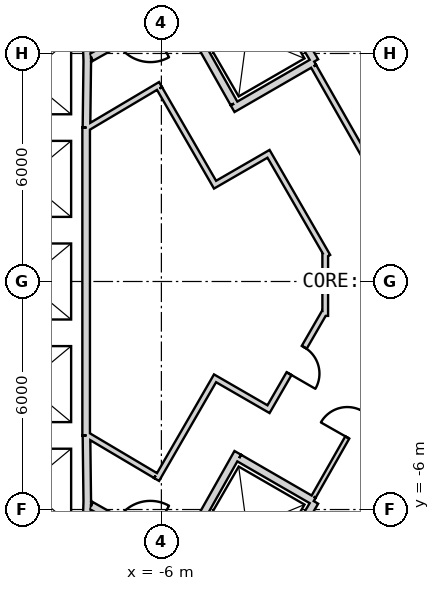
"""IFC4 building model, lengths in metres.
Left out: names, types, materials, properties, quantities, classifications, styles, units other than length and angle.
Written with IfcOpenShell. Run it as: python <this file> out.ifc"""

import sys

from ifc_helpers import new_model, si_unit, direction, frame, frame_2d, origin, place, context, subcontext, project, spatial, rectangle, extrude, element, fill, save


model = new_model("IFC4")
c1 = context("Model", 3, precision=1e-05, world=origin(), true_north=direction((0.0, 1.0)))
c2 = subcontext(c1, "Body", "Model", "MODEL_VIEW")
j1 = project(units=[si_unit("LENGTHUNIT", "METRE"), si_unit("PLANEANGLEUNIT", "RADIAN")], contexts=[c1])
p1 = place(None, origin())
s1 = spatial("IfcSite", under=j1, at=p1, CompositionType="ELEMENT")
p2 = place(p1, origin())
s2 = spatial("IfcBuilding", under=s1, at=p2, CompositionType="ELEMENT")
p3 = place(p2, frame((0.0, 0.0, 27.5)))
s3 = spatial("IfcBuildingStorey", under=s2, at=p3, CompositionType="ELEMENT", Elevation=27.5)
p4 = place(p3, frame((19.475, 2.208, 0.0), z_axis=(0.0, 0.0, 1.0), x_axis=(-0.866028369851, 0.499994862586, 0.0)))
e1 = element("IfcWall", 1, at=p4, inside=s3, PredefinedType="SHEAR", context=c2, shape_type="SweptSolid", body=[
    extrude(rectangle(XDim=31.523, YDim=0.9, at=frame_2d((15.762, 0.0))), origin(), (0.0, 0.0, 1.0), 6.0),
])
p5 = place(p4, frame((7.062, 0.0, 0.0)))
e2 = element("IfcOpeningElement", 2, at=p5, cuts=e1, PredefinedType="OPENING", context=c2, shape_type="SweptSolid", body=[
    extrude(rectangle(XDim=1.2, YDim=2.4, at=frame_2d((0.6, 1.2))), frame((0.0, 0.46, 0.0), z_axis=(0.0, -1.0, 0.0), x_axis=(1.0, 0.0, 0.0)), (0.0, 0.0, 1.0), 0.92),
])
p6 = place(p4, frame((9.762, 0.0, 0.0)))
e3 = element("IfcOpeningElement", 3, at=p6, cuts=e1, PredefinedType="OPENING", context=c2, shape_type="SweptSolid", body=[
    extrude(rectangle(XDim=1.2, YDim=2.4, at=frame_2d((0.6, 1.2))), frame((0.0, 0.46, 0.0), z_axis=(0.0, -1.0, 0.0), x_axis=(1.0, 0.0, 0.0)), (0.0, 0.0, 1.0), 0.92),
])
p7 = place(p4, frame((12.462, 0.0, 0.0)))
e4 = element("IfcOpeningElement", 4, at=p7, cuts=e1, PredefinedType="OPENING", context=c2, shape_type="SweptSolid", body=[
    extrude(rectangle(XDim=1.2, YDim=2.4, at=frame_2d((0.6, 1.2))), frame((0.0, 0.46, 0.0), z_axis=(0.0, -1.0, 0.0), x_axis=(1.0, 0.0, 0.0)), (0.0, 0.0, 1.0), 0.92),
])
p8 = place(p4, frame((15.162, 0.0, 0.0)))
e5 = element("IfcOpeningElement", 5, at=p8, cuts=e1, PredefinedType="OPENING", context=c2, shape_type="SweptSolid", body=[
    extrude(rectangle(XDim=1.2, YDim=2.4, at=frame_2d((0.6, 1.2))), frame((0.0, 0.46, 0.0), z_axis=(0.0, -1.0, 0.0), x_axis=(1.0, 0.0, 0.0)), (0.0, 0.0, 1.0), 0.92),
])
p9 = place(p4, frame((17.862, 0.0, 0.0)))
e6 = element("IfcOpeningElement", 6, at=p9, cuts=e1, PredefinedType="OPENING", context=c2, shape_type="SweptSolid", body=[
    extrude(rectangle(XDim=1.2, YDim=2.4, at=frame_2d((0.6, 1.2))), frame((0.0, 0.46, 0.0), z_axis=(0.0, -1.0, 0.0), x_axis=(1.0, 0.0, 0.0)), (0.0, 0.0, 1.0), 0.92),
])
p10 = place(p4, frame((20.562, 0.0, 0.0)))
e7 = element("IfcOpeningElement", 7, at=p10, cuts=e1, PredefinedType="OPENING", context=c2, shape_type="SweptSolid", body=[
    extrude(rectangle(XDim=1.2, YDim=2.4, at=frame_2d((0.6, 1.2))), frame((0.0, 0.46, 0.0), z_axis=(0.0, -1.0, 0.0), x_axis=(1.0, 0.0, 0.0)), (0.0, 0.0, 1.0), 0.92),
])
p11 = place(p4, frame((23.262, 0.0, 0.0)))
e8 = element("IfcOpeningElement", 8, at=p11, cuts=e1, PredefinedType="OPENING", context=c2, shape_type="SweptSolid", body=[
    extrude(rectangle(XDim=1.2, YDim=2.4, at=frame_2d((0.6, 1.2))), frame((0.0, 0.46, 0.0), z_axis=(0.0, -1.0, 0.0), x_axis=(1.0, 0.0, 0.0)), (0.0, 0.0, 1.0), 0.92),
])
p12 = place(p4, frame((3.612, 0.0, 0.0)))
e9 = element("IfcOpeningElement", 9, at=p12, cuts=e1, PredefinedType="OPENING", context=c2, shape_type="SweptSolid", body=[
    extrude(rectangle(XDim=1.2, YDim=2.4, at=frame_2d((0.6, 1.2))), frame((0.0, 0.46, 0.0), z_axis=(0.0, -1.0, 0.0), x_axis=(1.0, 0.0, 0.0)), (0.0, 0.0, 1.0), 0.92),
])
p13 = place(p4, frame((26.712, 0.0, 0.0)))
e10 = element("IfcOpeningElement", 10, at=p13, cuts=e1, PredefinedType="OPENING", context=c2, shape_type="SweptSolid", body=[
    extrude(rectangle(XDim=1.2, YDim=2.4, at=frame_2d((0.6, 1.2))), frame((0.0, 0.46, 0.0), z_axis=(0.0, -1.0, 0.0), x_axis=(1.0, 0.0, 0.0)), (0.0, 0.0, 1.0), 0.92),
])
p14 = place(p3, frame((-7.825, -17.97, 0.0), z_axis=(0.0, 0.0, 1.0), x_axis=(0.866028369851, 0.499994862586, 0.0)))
e11 = element("IfcWall", 11, at=p14, inside=s3, PredefinedType="SHEAR", context=c2, shape_type="SweptSolid", body=[
    extrude(rectangle(XDim=31.523, YDim=0.9, at=frame_2d((15.762, 0.0))), origin(), (0.0, 0.0, 1.0), 6.0),
])
p15 = place(p14, frame((7.062, 0.0, 0.0)))
e12 = element("IfcOpeningElement", 12, at=p15, cuts=e11, PredefinedType="OPENING", context=c2, shape_type="SweptSolid", body=[
    extrude(rectangle(XDim=1.2, YDim=2.4, at=frame_2d((0.6, 1.2))), frame((0.0, 0.46, 0.0), z_axis=(0.0, -1.0, 0.0), x_axis=(1.0, 0.0, 0.0)), (0.0, 0.0, 1.0), 0.92),
])
p16 = place(p14, frame((9.762, 0.0, 0.0)))
e13 = element("IfcOpeningElement", 13, at=p16, cuts=e11, PredefinedType="OPENING", context=c2, shape_type="SweptSolid", body=[
    extrude(rectangle(XDim=1.2, YDim=2.4, at=frame_2d((0.6, 1.2))), frame((0.0, 0.46, 0.0), z_axis=(0.0, -1.0, 0.0), x_axis=(1.0, 0.0, 0.0)), (0.0, 0.0, 1.0), 0.92),
])
p17 = place(p14, frame((12.462, 0.0, 0.0)))
e14 = element("IfcOpeningElement", 14, at=p17, cuts=e11, PredefinedType="OPENING", context=c2, shape_type="SweptSolid", body=[
    extrude(rectangle(XDim=1.2, YDim=2.4, at=frame_2d((0.6, 1.2))), frame((0.0, 0.46, 0.0), z_axis=(0.0, -1.0, 0.0), x_axis=(1.0, 0.0, 0.0)), (0.0, 0.0, 1.0), 0.92),
])
p18 = place(p14, frame((15.162, 0.0, 0.0)))
e15 = element("IfcOpeningElement", 15, at=p18, cuts=e11, PredefinedType="OPENING", context=c2, shape_type="SweptSolid", body=[
    extrude(rectangle(XDim=1.2, YDim=2.4, at=frame_2d((0.6, 1.2))), frame((0.0, 0.46, 0.0), z_axis=(0.0, -1.0, 0.0), x_axis=(1.0, 0.0, 0.0)), (0.0, 0.0, 1.0), 0.92),
])
p19 = place(p14, frame((17.862, 0.0, 0.0)))
e16 = element("IfcOpeningElement", 16, at=p19, cuts=e11, PredefinedType="OPENING", context=c2, shape_type="SweptSolid", body=[
    extrude(rectangle(XDim=1.2, YDim=2.4, at=frame_2d((0.6, 1.2))), frame((0.0, 0.46, 0.0), z_axis=(0.0, -1.0, 0.0), x_axis=(1.0, 0.0, 0.0)), (0.0, 0.0, 1.0), 0.92),
])
p20 = place(p14, frame((20.562, 0.0, 0.0)))
e17 = element("IfcOpeningElement", 17, at=p20, cuts=e11, PredefinedType="OPENING", context=c2, shape_type="SweptSolid", body=[
    extrude(rectangle(XDim=1.2, YDim=2.4, at=frame_2d((0.6, 1.2))), frame((0.0, 0.46, 0.0), z_axis=(0.0, -1.0, 0.0), x_axis=(1.0, 0.0, 0.0)), (0.0, 0.0, 1.0), 0.92),
])
p21 = place(p14, frame((26.712, 0.0, 0.0)))
e18 = element("IfcOpeningElement", 18, at=p21, cuts=e11, PredefinedType="OPENING", context=c2, shape_type="SweptSolid", body=[
    extrude(rectangle(XDim=1.2, YDim=2.4, at=frame_2d((0.6, 1.2))), frame((0.0, 0.46, 0.0), z_axis=(0.0, -1.0, 0.0), x_axis=(1.0, 0.0, 0.0)), (0.0, 0.0, 1.0), 0.92),
])
p22 = place(p14, frame((3.612, 0.0, 0.0)))
e19 = element("IfcOpeningElement", 19, at=p22, cuts=e11, PredefinedType="OPENING", context=c2, shape_type="SweptSolid", body=[
    extrude(rectangle(XDim=1.2, YDim=2.4, at=frame_2d((0.6, 1.2))), frame((0.0, 0.46, 0.0), z_axis=(0.0, -1.0, 0.0), x_axis=(1.0, 0.0, 0.0)), (0.0, 0.0, 1.0), 0.92),
])
p23 = place(p3, frame((-7.977, 6.65, 0.0), z_axis=(0.0, 0.0, 1.0), x_axis=(0.030861509705, -0.999523670164, 0.0)))
e20 = element("IfcWall", 20, at=p23, inside=s3, PredefinedType="PLUMBINGWALL", context=c2, shape_type="SweptSolid", body=[
    extrude(rectangle(XDim=0.878, YDim=0.2, at=frame_2d((0.439, 0.0))), origin(), (0.0, 0.0, 1.0), 5.7),
])
p24 = place(p3, frame((-7.949, 5.895, 0.0), z_axis=(0.0, 0.0, 1.0), x_axis=(-0.012042535896, -0.999927486035, 0.0)))
e21 = element("IfcWall", 21, at=p24, inside=s3, PredefinedType="PLUMBINGWALL", context=c2, shape_type="SweptSolid", body=[
    extrude(rectangle(XDim=1.845, YDim=0.2, at=frame_2d((0.922, 0.0))), origin(), (0.0, 0.0, 1.0), 5.7),
])
p25 = place(p3, frame((-7.98, 4.05, 0.0), z_axis=(0.0, 0.0, 1.0), x_axis=(0.0, -1.0, 0.0)))
e22 = element("IfcWall", 22, at=p25, inside=s3, PredefinedType="PLUMBINGWALL", context=c2, shape_type="SweptSolid", body=[
    extrude(rectangle(XDim=8.1, YDim=0.2, at=frame_2d((4.05, 0.0))), origin(), (0.0, 0.0, 1.0), 5.7),
])
p26 = place(p3, frame((-7.95, -5.772, 0.0), z_axis=(0.0, 0.0, 1.0), x_axis=(-0.030803413295, -0.999525462272, 0.0)))
e23 = element("IfcWall", 23, at=p26, inside=s3, PredefinedType="PLUMBINGWALL", context=c2, shape_type="SweptSolid", body=[
    extrude(rectangle(XDim=1.078, YDim=0.2, at=frame_2d((0.539, 0.0))), origin(), (0.0, 0.0, 1.0), 5.7),
])
p27 = place(p3, frame((-7.971, -4.05, 0.0), z_axis=(0.0, 0.0, 1.0), x_axis=(0.012042535896, -0.999927486035, 0.0)))
e24 = element("IfcWall", 24, at=p27, inside=s3, PredefinedType="PLUMBINGWALL", context=c2, shape_type="SweptSolid", body=[
    extrude(rectangle(XDim=1.845, YDim=0.2, at=frame_2d((0.922, 0.0))), origin(), (0.0, 0.0, 1.0), 5.7),
])
p28 = place(p3, frame((-3.538, 8.465, 0.0), z_axis=(0.0, 0.0, 1.0), x_axis=(0.508647062354, -0.860975125052, 0.0)))
e25 = element("IfcWall", 25, at=p28, inside=s3, PredefinedType="PLUMBINGWALL", context=c2, shape_type="SweptSolid", body=[
    extrude(rectangle(XDim=3.1, YDim=0.2, at=frame_2d((1.55, 0.0))), origin(), (0.0, 0.0, 1.0), 5.7),
])
p29 = place(p3, frame((-1.979, 5.786, 0.0), z_axis=(0.0, 0.0, 1.0), x_axis=(-0.866016689309, -0.500015093611, 0.0)))
e26 = element("IfcWall", 26, at=p29, inside=s3, PredefinedType="PLUMBINGWALL", context=c2, shape_type="SweptSolid", body=[
    extrude(rectangle(XDim=2.479, YDim=0.2, at=frame_2d((1.24, 0.0))), origin(), (0.0, 0.0, 1.0), 5.7),
])
p30 = place(p3, frame((-5.562, 7.296, 0.0), z_axis=(0.0, 0.0, 1.0), x_axis=(0.49134651263, -0.870964180966, 0.0)))
e27 = element("IfcWall", 27, at=p30, inside=s3, PredefinedType="PLUMBINGWALL", context=c2, shape_type="SweptSolid", body=[
    extrude(rectangle(XDim=3.0, YDim=0.2, at=frame_2d((1.5, 0.0))), origin(), (0.0, 0.0, 1.0), 5.7),
])
p31 = place(p3, frame((-1.961, -5.796, 0.0), z_axis=(0.0, 0.0, 1.0), x_axis=(-0.508647062354, -0.860975125052, 0.0)))
e28 = element("IfcWall", 28, at=p31, inside=s3, PredefinedType="PLUMBINGWALL", context=c2, shape_type="SweptSolid", body=[
    extrude(rectangle(XDim=3.1, YDim=0.2, at=frame_2d((1.55, 0.0))), origin(), (0.0, 0.0, 1.0), 5.7),
])
p32 = place(p3, frame((-3.99, -4.509, 0.0), z_axis=(0.0, 0.0, 1.0), x_axis=(-0.491358283181, -0.870957540612, 0.0)))
e29 = element("IfcWall", 29, at=p32, inside=s3, PredefinedType="PLUMBINGWALL", context=c2, shape_type="SweptSolid", body=[
    extrude(rectangle(XDim=3.2, YDim=0.2, at=frame_2d((1.6, 0.0))), origin(), (0.0, 0.0, 1.0), 5.7),
])
p33 = place(p3, frame((-3.953, -4.646, 0.0), z_axis=(0.0, 0.0, 1.0), x_axis=(0.866065302921, -0.4999308863, 0.0)))
e30 = element("IfcWall", 30, at=p33, inside=s3, PredefinedType="PLUMBINGWALL", context=c2, shape_type="SweptSolid", body=[
    extrude(rectangle(XDim=2.264, YDim=0.2, at=frame_2d((1.132, 0.0))), origin(), (0.0, 0.0, 1.0), 5.7),
])
p34 = place(p3, frame((-5.6, 7.16, 0.0), z_axis=(0.0, 0.0, 1.0), x_axis=(-0.871363259478, -0.490638431059, 0.0)))
e31 = element("IfcWall", 31, at=p34, inside=s3, PredefinedType="PARTITIONING", context=c2, shape_type="SweptSolid", body=[
    extrude(rectangle(XDim=2.581, YDim=0.2, at=frame_2d((1.291, 0.0))), origin(), (0.0, 0.0, 1.0), 5.7),
])
p35 = place(p34, frame((0.791, 0.0, 0.0)))
e32 = element("IfcOpeningElement", 32, at=p35, cuts=e31, PredefinedType="OPENING", context=c2, shape_type="SweptSolid", body=[
    extrude(rectangle(XDim=1.0, YDim=2.1, at=frame_2d((0.5, 1.05))), frame((0.0, 0.11, 0.0), z_axis=(0.0, -1.0, 0.0), x_axis=(1.0, 0.0, 0.0)), (0.0, 0.0, 1.0), 0.22),
])
p36 = place(p3, frame((-7.849, -5.894, 0.0), z_axis=(0.0, 0.0, 1.0), x_axis=(0.871363259478, -0.490638431059, 0.0)))
e33 = element("IfcWall", 33, at=p36, inside=s3, PredefinedType="PARTITIONING", context=c2, shape_type="SweptSolid", body=[
    extrude(rectangle(XDim=2.581, YDim=0.2, at=frame_2d((1.291, 0.0))), origin(), (0.0, 0.0, 1.0), 5.7),
])
p37 = place(p36, frame((0.791, 0.0, 0.0)))
e34 = element("IfcOpeningElement", 34, at=p37, cuts=e33, PredefinedType="OPENING", context=c2, shape_type="SweptSolid", body=[
    extrude(rectangle(XDim=1.0, YDim=2.1, at=frame_2d((0.5, 1.05))), frame((0.0, 0.11, 0.0), z_axis=(0.0, -1.0, 0.0), x_axis=(1.0, 0.0, 0.0)), (0.0, 0.0, 1.0), 0.22),
])
p38 = place(p3, frame((-1.994, 5.661, 0.0), z_axis=(0.0, 0.0, 1.0), x_axis=(0.494341211302, -0.869267948798, 0.0)))
e35 = element("IfcWall", 35, at=p38, inside=s3, PredefinedType="PLUMBINGWALL", context=c2, shape_type="SweptSolid", body=[
    extrude(rectangle(XDim=4.361, YDim=0.15, at=frame_2d((2.18, 0.0))), origin(), (0.0, 0.0, 1.0), 5.7),
])
p39 = place(p3, frame((0.224, -1.761, 0.0), z_axis=(0.0, 0.0, 1.0), x_axis=(-0.494327216836, -0.869275907118, 0.0)))
e36 = element("IfcWall", 36, at=p39, inside=s3, PredefinedType="PARTITIONING", context=c2, shape_type="SweptSolid", body=[
    extrude(rectangle(XDim=4.487, YDim=0.12, at=frame_2d((2.244, 0.0))), origin(), (0.0, 0.0, 1.0), 5.7),
])
p40 = place(p39, frame((1.895, 0.0, 0.0)))
e37 = element("IfcOpeningElement", 37, at=p40, cuts=e36, PredefinedType="OPENING", context=c2, shape_type="SweptSolid", body=[
    extrude(rectangle(XDim=0.8, YDim=2.1, at=frame_2d((0.4, 1.05))), frame((0.0, 0.07, 0.0), z_axis=(0.0, -1.0, 0.0), x_axis=(1.0, 0.0, 0.0)), (0.0, 0.0, 1.0), 0.14),
])
p41 = place(p3, frame((-6.024, 5.183, 0.0), z_axis=(0.0, 0.0, 1.0), x_axis=(-0.860126804455, -0.510080268447, 0.0)))
e38 = element("IfcWall", 38, at=p41, inside=s3, PredefinedType="PLUMBINGWALL", context=c2, shape_type="SweptSolid", body=[
    extrude(rectangle(XDim=2.24, YDim=0.15, at=frame_2d((1.12, 0.0))), origin(), (0.0, 0.0, 1.0), 5.7),
])
p42 = place(p3, frame((-4.551, 2.482, 0.0), z_axis=(0.0, 0.0, 1.0), x_axis=(-0.499990139034, 0.866031096941, 0.0)))
e39 = element("IfcWall", 39, at=p42, inside=s3, PredefinedType="PLUMBINGWALL", context=c2, shape_type="SweptSolid", body=[
    extrude(rectangle(XDim=3.0, YDim=0.15, at=frame_2d((1.5, 0.0))), origin(), (0.0, 0.0, 1.0), 5.7),
])
p43 = place(p3, frame((-3.116, 3.397, 0.0), z_axis=(0.0, 0.0, 1.0), x_axis=(-0.866053003207, -0.499952193351, 0.0)))
e40 = element("IfcWall", 40, at=p43, inside=s3, PredefinedType="PLUMBINGWALL", context=c2, shape_type="SweptSolid", body=[
    extrude(rectangle(XDim=1.625, YDim=0.15, at=frame_2d((0.812, 0.0))), origin(), (0.0, 0.0, 1.0), 5.7),
])
p44 = place(p3, frame((-1.624, 0.663, 0.0), z_axis=(0.0, 0.0, 1.0), x_axis=(-0.500035348339, 0.866004994449, 0.0)))
e41 = element("IfcWall", 41, at=p44, inside=s3, PredefinedType="PLUMBINGWALL", context=c2, shape_type="SweptSolid", body=[
    extrude(rectangle(XDim=3.039, YDim=0.15, at=frame_2d((1.52, 0.0))), origin(), (0.0, 0.0, 1.0), 5.7),
])
p45 = place(p3, frame((-1.689, -0.905, 0.0), z_axis=(0.0, 0.0, 1.0), x_axis=(0.0, 1.0, 0.0)))
e42 = element("IfcWall", 42, at=p45, inside=s3, PredefinedType="PLUMBINGWALL", context=c2, shape_type="SweptSolid", body=[
    extrude(rectangle(XDim=1.656, YDim=0.15, at=frame_2d((0.828, 0.0))), origin(), (0.0, 0.0, 1.0), 5.7),
])
p46 = place(p3, frame((-3.219, -3.425, 0.0), z_axis=(0.0, 0.0, 1.0), x_axis=(0.499996236806, 0.866027576455, 0.0)))
e43 = element("IfcWall", 43, at=p46, inside=s3, PredefinedType="PLUMBINGWALL", context=c2, shape_type="SweptSolid", body=[
    extrude(rectangle(XDim=3.036, YDim=0.15, at=frame_2d((1.518, 0.0))), origin(), (0.0, 0.0, 1.0), 5.7),
])
p47 = place(p46, frame((1.156, 0.0, 0.0)))
e44 = element("IfcOpeningElement", 44, at=p47, cuts=e43, PredefinedType="OPENING", context=c2, shape_type="SweptSolid", body=[
    extrude(rectangle(XDim=0.8, YDim=2.1, at=frame_2d((0.4, 1.05))), frame((0.0, 0.085, 0.0), z_axis=(0.0, -1.0, 0.0), x_axis=(1.0, 0.0, 0.0)), (0.0, 0.0, 1.0), 0.17),
])
p48 = place(p3, frame((-4.653, -2.51, 0.0), z_axis=(0.0, 0.0, 1.0), x_axis=(0.866053003207, -0.499952193351, 0.0)))
e45 = element("IfcWall", 45, at=p48, inside=s3, PredefinedType="PLUMBINGWALL", context=c2, shape_type="SweptSolid", body=[
    extrude(rectangle(XDim=1.625, YDim=0.15, at=frame_2d((0.812, 0.0))), origin(), (0.0, 0.0, 1.0), 5.7),
])
p49 = place(p3, frame((-6.126, -5.21, 0.0), z_axis=(0.0, 0.0, 1.0), x_axis=(0.499990139034, 0.866031096941, 0.0)))
e46 = element("IfcWall", 46, at=p49, inside=s3, PredefinedType="PLUMBINGWALL", context=c2, shape_type="SweptSolid", body=[
    extrude(rectangle(XDim=3.0, YDim=0.15, at=frame_2d((1.5, 0.0))), origin(), (0.0, 0.0, 1.0), 5.7),
])
p50 = place(p3, frame((-7.95, -4.041, 0.0), z_axis=(0.0, 0.0, 1.0), x_axis=(0.860090281069, -0.510141851263, 0.0)))
e47 = element("IfcWall", 47, at=p50, inside=s3, PredefinedType="PLUMBINGWALL", context=c2, shape_type="SweptSolid", body=[
    extrude(rectangle(XDim=2.089, YDim=0.15, at=frame_2d((1.045, 0.0))), origin(), (0.0, 0.0, 1.0), 5.7),
])
p51 = place(p40, origin())
e48 = element("IfcDoor", 48, at=p51, inside=s3, OperationType="SINGLE_SWING_RIGHT", PredefinedType="USERDEFINED", context=c2, shape_type="SweptSolid", body=[
    extrude(rectangle(XDim=0.8, YDim=2.1, at=frame_2d((0.4, 1.05))), frame((0.0, 0.025, 0.0), z_axis=(0.0, -1.0, 0.0), x_axis=(1.0, 0.0, 0.0)), (0.0, 0.0, 1.0), 0.05),
])
fill(e37, e48)
p52 = place(p47, origin())
e49 = element("IfcDoor", 49, at=p52, inside=s3, OperationType="SINGLE_SWING_LEFT", PredefinedType="USERDEFINED", context=c2, shape_type="SweptSolid", body=[
    extrude(rectangle(XDim=0.8, YDim=2.1, at=frame_2d((0.4, 1.05))), frame((0.0, 0.025, 0.0), z_axis=(0.0, -1.0, 0.0), x_axis=(1.0, 0.0, 0.0)), (0.0, 0.0, 1.0), 0.05),
])
fill(e44, e49)
save(model, sys.argv[1])
